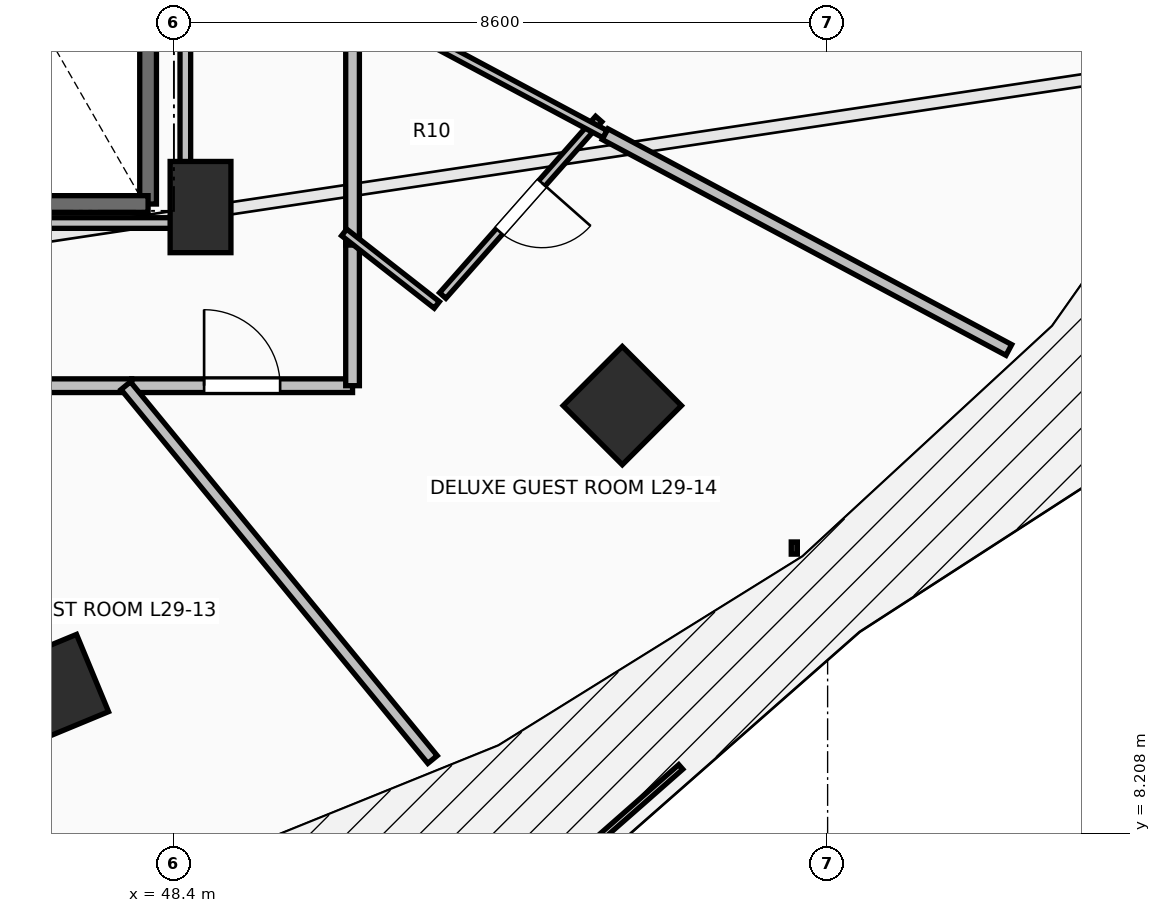
"""IFC4 building model, lengths in metres.
Left out: names, types, materials, properties, quantities, classifications, styles, units other than length and angle.
Written with IfcOpenShell. Run it as: python <this file> out.ifc"""

import sys

from ifc_helpers import new_model, si_unit, direction, frame, frame_2d, origin, origin_2d, place, context, subcontext, project, spatial, rectangle, extrude, element, fill, save


model = new_model("IFC4")
c1 = context("Model", 3, precision=1e-05, world=origin(), true_north=direction((0.0, 1.0)))
c2 = subcontext(c1, "Body", "Model", "MODEL_VIEW")
j1 = project(units=[si_unit("LENGTHUNIT", "METRE"), si_unit("PLANEANGLEUNIT", "RADIAN")], contexts=[c1])
p1 = place(None, origin())
s1 = spatial("IfcSite", under=j1, at=p1, CompositionType="ELEMENT")
p2 = place(p1, origin())
s2 = spatial("IfcBuilding", under=s1, at=p2, CompositionType="ELEMENT")
p3 = place(p2, frame((0.0, 0.0, 110.3)))
s3 = spatial("IfcBuildingStorey", under=s2, at=p3, CompositionType="ELEMENT", Elevation=110.3)
for number, where, z_axis, x_axis in (
    (1, (46.821, 10.109, 0.0), (0.0, 0.0, 1.0), (0.383, -0.924, 0.0)),
    (2, (54.299, 13.838, 0.0), (0.0, 0.0, 1.0), (0.707, -0.707, 0.0)),
):
    element("IfcColumn", number, at=place(p3, frame(where, z_axis=z_axis, x_axis=x_axis)), inside=s3, PredefinedType="COLUMN", context=c2, shape_type="SweptSolid", body=[
        extrude(rectangle(XDim=1.1, YDim=1.1, at=origin_2d()), origin(), (0.0, 0.0, 1.0), 3.5),
    ])
p4 = place(p3, frame((48.75, 16.45, 0.0), z_axis=(0.0, 0.0, 1.0), x_axis=(1.0, 0.0, 0.0)))
e3 = element("IfcColumn", 3, at=p4, inside=s3, PredefinedType="PILASTER", context=c2, shape_type="SweptSolid", body=[
    extrude(rectangle(XDim=0.8, YDim=1.2, at=origin_2d()), origin(), (0.0, 0.0, 1.0), 3.5),
])
p5 = place(p3, frame((48.06, 23.91, 0.0), z_axis=(0.0, 0.0, 1.0), x_axis=(0.0, -1.0, 0.0)))
e4 = element("IfcWall", 4, at=p5, inside=s3, PredefinedType="SOLIDWALL", context=c2, shape_type="SweptSolid", body=[
    extrude(rectangle(XDim=7.42, YDim=0.22, at=frame_2d((3.71, 0.0))), origin(), (0.0, 0.0, 1.0), 3.24),
])
p6 = place(p3, frame((48.06, 16.49, 0.0), z_axis=(0.0, 0.0, 1.0), x_axis=(-1.0, 0.0, 0.0)))
e5 = element("IfcWall", 5, at=p6, inside=s3, PredefinedType="SOLIDWALL", context=c2, shape_type="SweptSolid", body=[
    extrude(rectangle(XDim=3.37, YDim=0.22, at=frame_2d((1.685, 0.0))), origin(), (0.0, 0.0, 1.0), 3.24),
])
p7 = place(p3, frame((43.945, 14.1, 0.0), z_axis=(0.0, 0.0, 1.0), x_axis=(1.0, 0.0, 0.0)))
e6 = element("IfcWall", 6, at=p7, inside=s3, PredefinedType="PARTITIONING", context=c2, shape_type="SweptSolid", body=[
    extrude(rectangle(XDim=3.899, YDim=0.18, at=frame_2d((1.949, 0.0))), origin(), (0.0, 0.0, 1.0), 2.432),
])
p8 = place(p7, frame((1.449, 0.0, 0.0)))
e7 = element("IfcOpeningElement", 7, at=p8, cuts=e6, PredefinedType="OPENING", context=c2, shape_type="SweptSolid", body=[
    extrude(rectangle(XDim=1.0, YDim=2.15, at=frame_2d((0.5, 1.075))), frame((0.0, 0.105, 0.0), z_axis=(0.0, -1.0, 0.0), x_axis=(1.0, 0.0, 0.0)), (0.0, 0.0, 1.0), 0.21),
])
p9 = place(p3, frame((47.844, 14.1, 0.0), z_axis=(0.0, 0.0, 1.0), x_axis=(1.0, 0.0, 0.0)))
e8 = element("IfcWall", 8, at=p9, inside=s3, PredefinedType="PARTITIONING", context=c2, shape_type="SweptSolid", body=[
    extrude(rectangle(XDim=2.906, YDim=0.18, at=frame_2d((1.453, 0.0))), origin(), (0.0, 0.0, 1.0), 2.432),
])
p10 = place(p9, frame((0.953, 0.0, 0.0)))
e9 = element("IfcOpeningElement", 9, at=p10, cuts=e8, PredefinedType="OPENING", context=c2, shape_type="SweptSolid", body=[
    extrude(rectangle(XDim=1.0, YDim=2.15, at=frame_2d((0.5, 1.075))), frame((0.0, 0.105, 0.0), z_axis=(0.0, -1.0, 0.0), x_axis=(1.0, 0.0, 0.0)), (0.0, 0.0, 1.0), 0.21),
])
p11 = place(p3, frame((50.75, 14.1, 0.0), z_axis=(0.0, 0.0, 1.0), x_axis=(0.0, 1.0, 0.0)))
e10 = element("IfcWall", 10, at=p11, inside=s3, PredefinedType="PARTITIONING", context=c2, shape_type="SweptSolid", body=[
    extrude(rectangle(XDim=1.99, YDim=0.18, at=frame_2d((0.995, 0.0))), origin(), (0.0, 0.0, 1.0), 2.432),
])
p12 = place(p3, frame((50.75, 15.95, 0.0), z_axis=(0.0, 0.0, 1.0), x_axis=(0.0, 1.0, 0.0)))
e11 = element("IfcWall", 11, at=p12, inside=s3, PredefinedType="PARTITIONING", context=c2, shape_type="SweptSolid", body=[
    extrude(rectangle(XDim=3.435, YDim=0.18, at=frame_2d((1.718, 0.0))), origin(), (0.0, 0.0, 1.0), 2.929),
])
p13 = place(p3, frame((51.802, 9.182, 0.0), z_axis=(0.0, 0.0, 1.0), x_axis=(-0.634357186002, 0.773040076948, 0.0)))
e12 = element("IfcWall", 12, at=p13, inside=s3, PredefinedType="PARTITIONING", context=c2, shape_type="SweptSolid", body=[
    extrude(rectangle(XDim=6.362, YDim=0.16, at=frame_2d((3.181, 0.0))), origin(), (0.0, 0.0, 1.0), 2.432),
])
p14 = place(p3, frame((53.989, 17.608, 0.0), z_axis=(0.0, 0.0, 1.0), x_axis=(-0.662322264705, -0.749219071885, 0.0)))
e13 = element("IfcWall", 13, at=p14, inside=s3, PredefinedType="PARTITIONING", context=c2, shape_type="SweptSolid", body=[
    extrude(rectangle(XDim=3.099, YDim=0.11, at=frame_2d((1.549, 0.0))), origin(), (0.0, 0.0, 1.0), 2.886),
])
p15 = place(p14, frame((1.125, 0.0, 0.0)))
e14 = element("IfcOpeningElement", 14, at=p15, cuts=e13, PredefinedType="OPENING", context=c2, shape_type="SweptSolid", body=[
    extrude(rectangle(XDim=0.85, YDim=2.1, at=frame_2d((0.425, 1.05))), frame((0.0, 0.07, 0.0), z_axis=(0.0, -1.0, 0.0), x_axis=(1.0, 0.0, 0.0)), (0.0, 0.0, 1.0), 0.14),
])
p16 = place(p3, frame((51.858, 15.163, 0.0), z_axis=(0.0, 0.0, 1.0), x_axis=(-0.787564922247, 0.61623168796, 0.0)))
e15 = element("IfcWall", 15, at=p16, inside=s3, PredefinedType="PARTITIONING", context=c2, shape_type="SweptSolid", body=[
    extrude(rectangle(XDim=1.548, YDim=0.11, at=frame_2d((0.774, 0.0))), origin(), (0.0, 0.0, 1.0), 2.432),
])
p17 = place(p3, frame((54.073, 17.409, 0.0), z_axis=(0.0, 0.0, 1.0), x_axis=(-0.881911515214, 0.47141497572, 0.0)))
e16 = element("IfcWall", 16, at=p17, inside=s3, PredefinedType="PARTITIONING", context=c2, shape_type="SweptSolid", body=[
    extrude(rectangle(XDim=3.907, YDim=0.11, at=frame_2d((1.954, 0.0))), origin(), (0.0, 0.0, 1.0), 2.886),
])
p18 = place(p3, frame((59.384, 14.57, 0.0), z_axis=(0.0, 0.0, 1.0), x_axis=(-0.881918302895, 0.471402277274, 0.0)))
e17 = element("IfcWall", 17, at=p18, inside=s3, PredefinedType="PARTITIONING", context=c2, shape_type="SweptSolid", body=[
    extrude(rectangle(XDim=6.023, YDim=0.16, at=frame_2d((3.011, 0.0))), origin(), (0.0, 0.0, 1.0), 2.677),
])
p19 = place(p3, frame((48.55, 23.754, 0.0), z_axis=(0.0, 0.0, 1.0), x_axis=(0.0, -1.0, 0.0)))
e18 = element("IfcWall", 18, at=p19, inside=s3, PredefinedType="PARTITIONING", context=c2, shape_type="SweptSolid", body=[
    extrude(rectangle(XDim=7.514, YDim=0.14, at=frame_2d((3.757, 0.0))), origin(), (0.0, 0.0, 1.0), 2.432),
])
p20 = place(p3, frame((48.55, 16.24, 0.0), z_axis=(0.0, 0.0, 1.0), x_axis=(-1.0, 0.0, 0.0)))
e19 = element("IfcWall", 19, at=p20, inside=s3, PredefinedType="PARTITIONING", context=c2, shape_type="SweptSolid", body=[
    extrude(rectangle(XDim=3.745, YDim=0.14, at=frame_2d((1.873, 0.0))), origin(), (0.0, 0.0, 1.0), 2.432),
])
p21 = place(p10, origin())
e20 = element("IfcDoor", 20, at=p21, inside=s3, OperationType="SINGLE_SWING_LEFT", PredefinedType="DOOR", context=c2, shape_type="SweptSolid", body=[
    extrude(rectangle(XDim=1.0, YDim=2.15, at=frame_2d((0.5, 1.075))), frame((0.0, 0.025, 0.0), z_axis=(0.0, -1.0, 0.0), x_axis=(1.0, 0.0, 0.0)), (0.0, 0.0, 1.0), 0.05),
])
fill(e9, e20)
p22 = place(p15, origin())
e21 = element("IfcDoor", 21, at=p22, inside=s3, OperationType="SINGLE_SWING_LEFT", PredefinedType="DOOR", context=c2, shape_type="SweptSolid", body=[
    extrude(rectangle(XDim=0.85, YDim=2.1, at=frame_2d((0.425, 1.05))), frame((0.0, 0.025, 0.0), z_axis=(0.0, -1.0, 0.0), x_axis=(1.0, 0.0, 0.0)), (0.0, 0.0, 1.0), 0.05),
])
fill(e14, e21)
save(model, sys.argv[1])
